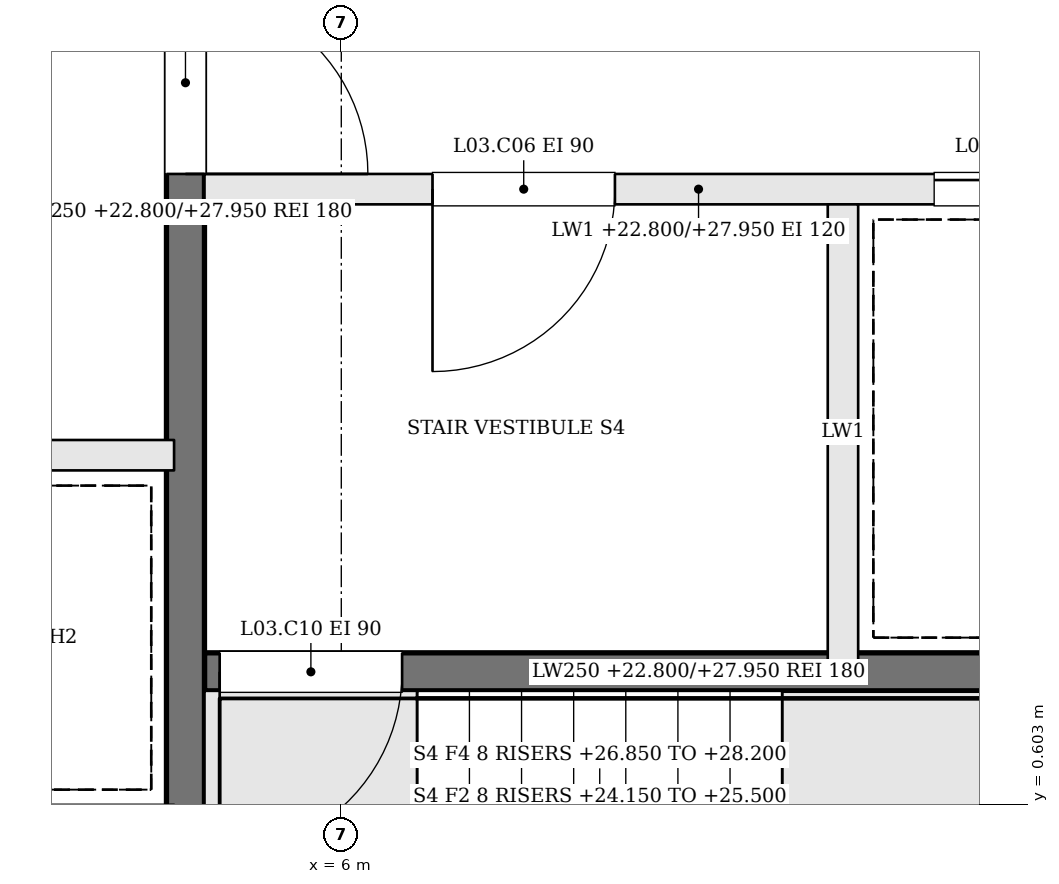
"""IFC4 building model, lengths in metres.
Left out: names, types, materials, properties, quantities, classifications, styles, units other than length and angle.
Written with IfcOpenShell. Run it as: python <this file> out.ifc"""

import sys

from ifc_helpers import new_model, si_unit, direction, frame, frame_2d, origin, place, context, subcontext, project, spatial, rectangle, extrude, element, fill, save


model = new_model("IFC4")
c1 = context("Model", 3, precision=1e-05, world=origin(), true_north=direction((0.0, 1.0)))
c2 = subcontext(c1, "Body", "Model", "MODEL_VIEW")
j1 = project(units=[si_unit("LENGTHUNIT", "METRE"), si_unit("PLANEANGLEUNIT", "RADIAN")], contexts=[c1])
p1 = place(None, origin())
s1 = spatial("IfcSite", under=j1, at=p1, CompositionType="ELEMENT")
p2 = place(p1, origin())
s2 = spatial("IfcBuilding", under=s1, at=p2, CompositionType="ELEMENT")
p3 = place(p2, frame((0.0, 0.0, 22.8)))
s3 = spatial("IfcBuildingStorey", under=s2, at=p3, CompositionType="ELEMENT", Elevation=22.8)
p4 = place(p3, frame((11.6, 4.65, 0.0), z_axis=(0.0, 0.0, 1.0), x_axis=(-1.0, 0.0, 0.0)))
e1 = element("IfcWall", 1, at=p4, inside=s3, PredefinedType="SOLIDWALL", context=c2, shape_type="SweptSolid", body=[
    extrude(rectangle(XDim=6.5, YDim=0.2, at=frame_2d((3.25, 0.0))), origin(), (0.0, 0.0, 1.0), 5.15),
])
p5 = place(p4, frame((3.8, 0.0, 0.0)))
e2 = element("IfcOpeningElement", 2, at=p5, cuts=e1, PredefinedType="OPENING", context=c2, shape_type="SweptSolid", body=[
    extrude(rectangle(XDim=1.2, YDim=2.1, at=frame_2d((0.6, 1.05))), frame((0.0, 0.11, 0.0), z_axis=(0.0, -1.0, 0.0), x_axis=(1.0, 0.0, 0.0)), (0.0, 0.0, 1.0), 0.22),
])
p6 = place(p4, frame((0.5, 0.0, 0.0)))
e3 = element("IfcOpeningElement", 3, at=p6, cuts=e1, PredefinedType="OPENING", context=c2, shape_type="SweptSolid", body=[
    extrude(rectangle(XDim=1.2, YDim=2.1, at=frame_2d((0.6, 1.05))), frame((0.0, 0.11, 0.0), z_axis=(0.0, -1.0, 0.0), x_axis=(1.0, 0.0, 0.0)), (0.0, 0.0, 1.0), 0.22),
])
p7 = place(p3, frame((11.6, 1.475, 0.0), z_axis=(0.0, 0.0, 1.0), x_axis=(-1.0, 0.0, 0.0)))
e4 = element("IfcWall", 4, at=p7, inside=s3, PredefinedType="SOLIDWALL", context=c2, shape_type="SweptSolid", body=[
    extrude(rectangle(XDim=6.5, YDim=0.25, at=frame_2d((3.25, 0.0))), origin(), (0.0, 0.0, 1.0), 5.15),
])
p8 = place(p7, frame((5.2, 0.0, 0.0)))
e5 = element("IfcOpeningElement", 5, at=p8, cuts=e4, PredefinedType="OPENING", context=c2, shape_type="SweptSolid", body=[
    extrude(rectangle(XDim=1.2, YDim=2.1, at=frame_2d((0.6, 1.05))), frame((0.0, 0.135, 0.0), z_axis=(0.0, -1.0, 0.0), x_axis=(1.0, 0.0, 0.0)), (0.0, 0.0, 1.0), 0.27),
])
p9 = place(p3, frame((9.3, 4.55, 0.0), z_axis=(0.0, 0.0, 1.0), x_axis=(0.0, -1.0, 0.0)))
e6 = element("IfcWall", 6, at=p9, inside=s3, PredefinedType="SOLIDWALL", context=c2, shape_type="SweptSolid", body=[
    extrude(rectangle(XDim=3.0, YDim=0.2, at=frame_2d((1.5, 0.0))), origin(), (0.0, 0.0, 1.0), 5.15),
])
p10 = place(p3, frame((4.975, 10.6, 0.0), z_axis=(0.0, 0.0, 1.0), x_axis=(0.0, -1.0, 0.0)))
e7 = element("IfcWall", 7, at=p10, inside=s3, PredefinedType="SOLIDWALL", context=c2, shape_type="SweptSolid", body=[
    extrude(rectangle(XDim=12.2, YDim=0.25, at=frame_2d((6.1, 0.0))), origin(), (0.0, 0.0, 1.0), 5.15),
])
p11 = place(p10, frame((4.65, 0.0, 0.0)))
e8 = element("IfcOpeningElement", 8, at=p11, cuts=e7, PredefinedType="OPENING", context=c2, shape_type="SweptSolid", body=[
    extrude(rectangle(XDim=1.2, YDim=2.1, at=frame_2d((0.6, 1.05))), frame((0.0, 0.135, 0.0), z_axis=(0.0, -1.0, 0.0), x_axis=(1.0, 0.0, 0.0)), (0.0, 0.0, 1.0), 0.27),
])
p12 = place(p3, frame((-4.9, 2.9, 0.0), z_axis=(0.0, 0.0, 1.0), x_axis=(1.0, 0.0, 0.0)))
e9 = element("IfcWall", 9, at=p12, inside=s3, PredefinedType="SOLIDWALL", context=c2, shape_type="SweptSolid", body=[
    extrude(rectangle(XDim=9.8, YDim=0.2, at=frame_2d((4.9, 0.0))), origin(), (0.0, 0.0, 1.0), 5.15),
])
p13 = place(p12, frame((0.675, 0.0, 0.0)))
e10 = element("IfcOpeningElement", 10, at=p13, cuts=e9, PredefinedType="OPENING", context=c2, shape_type="SweptSolid", body=[
    extrude(rectangle(XDim=1.1, YDim=2.1, at=frame_2d((0.55, 1.05))), frame((0.0, 0.11, 0.0), z_axis=(0.0, -1.0, 0.0), x_axis=(1.0, 0.0, 0.0)), (0.0, 0.0, 1.0), 0.22),
])
p14 = place(p12, frame((3.125, 0.0, 0.0)))
e11 = element("IfcOpeningElement", 11, at=p14, cuts=e9, PredefinedType="OPENING", context=c2, shape_type="SweptSolid", body=[
    extrude(rectangle(XDim=1.1, YDim=2.1, at=frame_2d((0.55, 1.05))), frame((0.0, 0.11, 0.0), z_axis=(0.0, -1.0, 0.0), x_axis=(1.0, 0.0, 0.0)), (0.0, 0.0, 1.0), 0.22),
])
p15 = place(p11, origin())
e12 = element("IfcDoor", 12, at=p15, inside=s3, OperationType="SINGLE_SWING_RIGHT", PredefinedType="DOOR", context=c2, shape_type="SweptSolid", body=[
    extrude(rectangle(XDim=1.2, YDim=2.1, at=frame_2d((0.6, 1.05))), frame((0.0, 0.025, 0.0), z_axis=(0.0, -1.0, 0.0), x_axis=(1.0, 0.0, 0.0)), (0.0, 0.0, 1.0), 0.05),
])
fill(e8, e12)
p16 = place(p5, origin())
e13 = element("IfcDoor", 13, at=p16, inside=s3, OperationType="SINGLE_SWING_RIGHT", PredefinedType="DOOR", context=c2, shape_type="SweptSolid", body=[
    extrude(rectangle(XDim=1.2, YDim=2.1, at=frame_2d((0.6, 1.05))), frame((0.0, 0.025, 0.0), z_axis=(0.0, -1.0, 0.0), x_axis=(1.0, 0.0, 0.0)), (0.0, 0.0, 1.0), 0.05),
])
fill(e2, e13)
p17 = place(p8, origin())
e14 = element("IfcDoor", 14, at=p17, inside=s3, OperationType="SINGLE_SWING_RIGHT", PredefinedType="DOOR", context=c2, shape_type="SweptSolid", body=[
    extrude(rectangle(XDim=1.2, YDim=2.1, at=frame_2d((0.6, 1.05))), frame((0.0, 0.025, 0.0), z_axis=(0.0, -1.0, 0.0), x_axis=(1.0, 0.0, 0.0)), (0.0, 0.0, 1.0), 0.05),
])
fill(e5, e14)
p18 = place(p6, origin())
e15 = element("IfcDoor", 15, at=p18, inside=s3, OperationType="SLIDING_TO_RIGHT", PredefinedType="DOOR", context=c2, shape_type="SweptSolid", body=[
    extrude(rectangle(XDim=1.2, YDim=2.1, at=frame_2d((0.6, 1.05))), frame((0.0, 0.025, 0.0), z_axis=(0.0, -1.0, 0.0), x_axis=(1.0, 0.0, 0.0)), (0.0, 0.0, 1.0), 0.05),
])
fill(e3, e15)
save(model, sys.argv[1])
